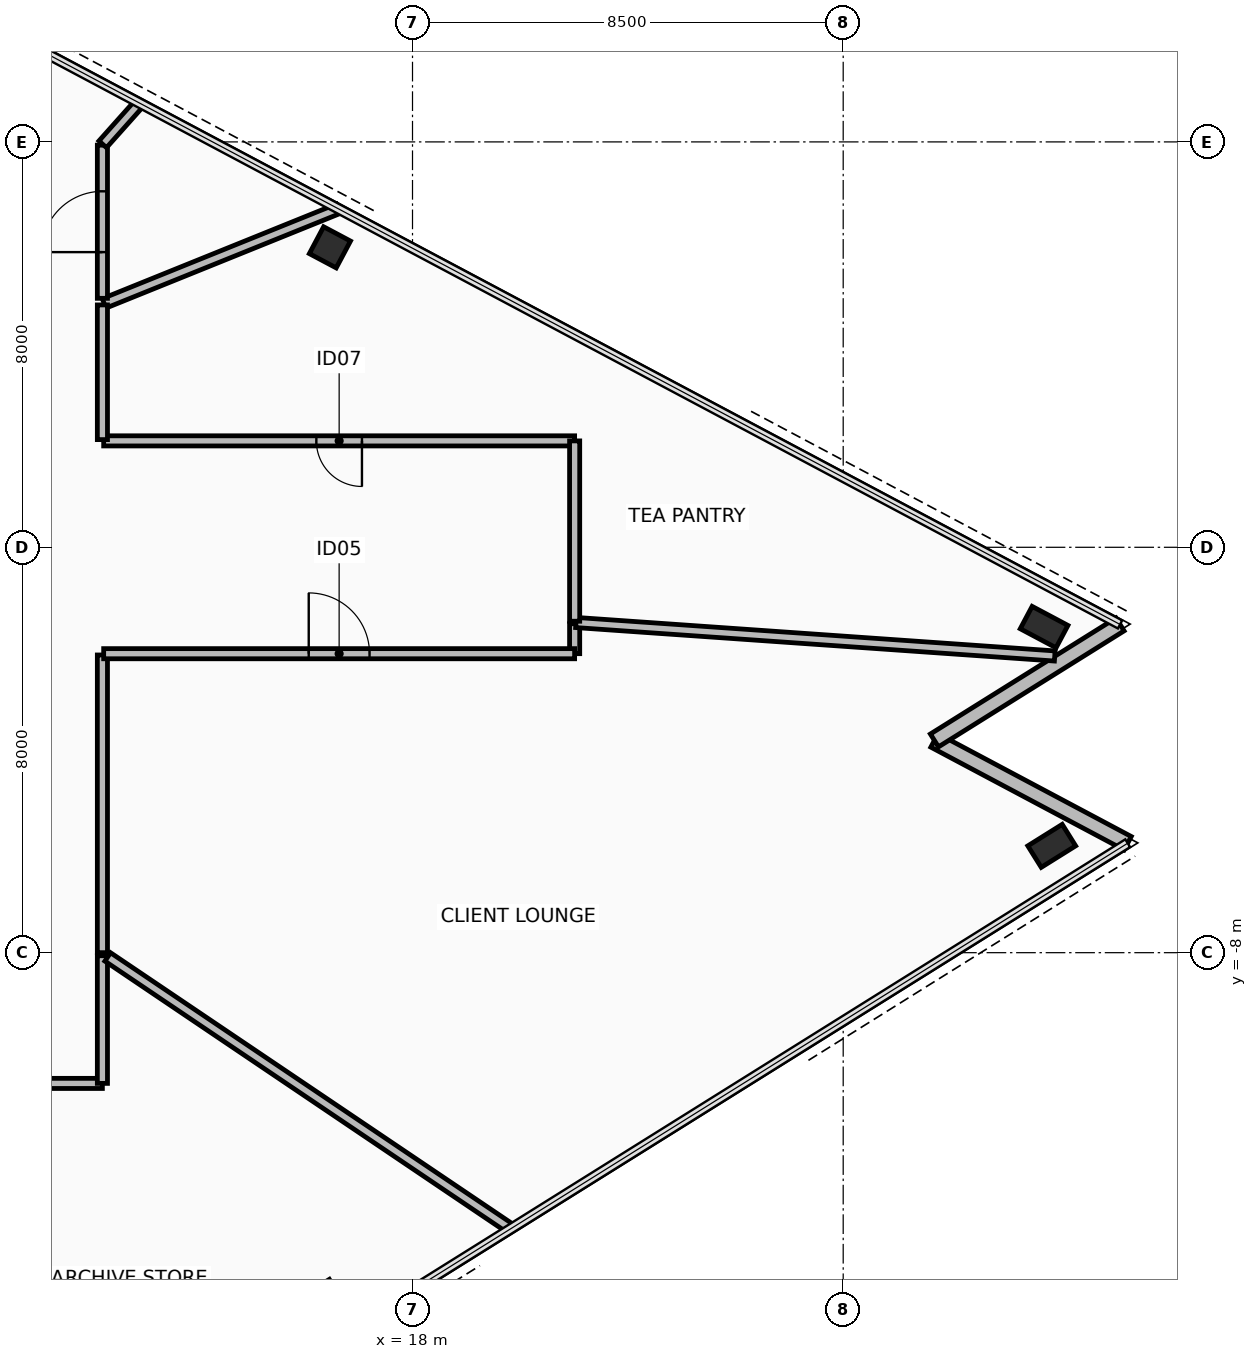
"""IFC4 building model, lengths in metres.
Left out: names, types, materials, properties, quantities, classifications, styles, units other than length and angle.
Written with IfcOpenShell. Run it as: python <this file> out.ifc"""

import sys

from ifc_helpers import new_model, si_unit, direction, frame, frame_2d, origin, origin_2d, place, context, subcontext, project, spatial, rectangle, hollow_rectangle, extrude, element, fill, save


model = new_model("IFC4")
c1 = context("Model", 3, precision=1e-05, world=origin(), true_north=direction((0.0, 1.0)))
c2 = subcontext(c1, "Body", "Model", "MODEL_VIEW")
j1 = project(units=[si_unit("LENGTHUNIT", "METRE"), si_unit("PLANEANGLEUNIT", "RADIAN")], contexts=[c1])
p1 = place(None, origin())
s1 = spatial("IfcSite", under=j1, at=p1, CompositionType="ELEMENT")
p2 = place(p1, origin())
s2 = spatial("IfcBuilding", under=s1, at=p2, CompositionType="ELEMENT")
p3 = place(p2, frame((0.0, 0.0, 149.6)))
s3 = spatial("IfcBuildingStorey", under=s2, at=p3, CompositionType="ELEMENT", Elevation=149.6)
for number, where, z_axis, x_axis in (
    (1, (30.615, -5.892, 0.0), (0.0, 0.0, 1.0), (0.848, 0.53, 0.0)),
    (2, (30.465, -1.575, 0.0), (0.0, 0.0, 1.0), (-0.883, 0.469, 0.0)),
):
    element("IfcColumn", number, at=place(p3, frame(where, z_axis=z_axis, x_axis=x_axis)), inside=s3, PredefinedType="COLUMN", context=c2, shape_type="SweptSolid", body=[
        extrude(hollow_rectangle(XDim=0.5, YDim=0.8, WallThickness=0.04, at=origin_2d()), origin(), (0.0, 0.0, 1.0), 3.6),
    ])
p4 = place(p3, frame((16.37, 5.919, 0.0), z_axis=(0.0, 0.0, 1.0), x_axis=(-0.88294841224, 0.469470021751, 0.0)))
e3 = element("IfcColumn", 3, at=p4, inside=s3, PredefinedType="COLUMN", context=c2, shape_type="SweptSolid", body=[
    extrude(hollow_rectangle(XDim=0.6, YDim=0.6, WallThickness=0.036, at=origin_2d()), origin(), (0.0, 0.0, 1.0), 3.6),
])
p5 = place(p3, frame((32.115, -5.84, 0.0), z_axis=(0.0, 0.0, 1.0), x_axis=(-0.882945167019, 0.469476125099, 0.0)))
e4 = element("IfcWall", 4, at=p5, inside=s3, PredefinedType="STANDARD", context=c2, shape_type="SweptSolid", body=[
    extrude(rectangle(XDim=4.32, YDim=0.3, at=frame_2d((2.16, 0.0))), origin(), (0.0, 0.0, 1.0), 2.705),
])
p6 = place(p3, frame((28.3, -3.812, 0.0), z_axis=(0.0, 0.0, 1.0), x_axis=(0.848042749904, 0.529927819929, 0.0)))
e5 = element("IfcWall", 5, at=p6, inside=s3, PredefinedType="STANDARD", context=c2, shape_type="SweptSolid", body=[
    extrude(rectangle(XDim=4.32, YDim=0.3, at=frame_2d((2.16, 0.0))), origin(), (0.0, 0.0, 1.0), 2.705),
])
p7 = place(p3, frame((16.536, 6.681, 0.0), z_axis=(0.0, 0.0, 1.0), x_axis=(-0.927180663406, -0.374614491718, 0.0)))
e6 = element("IfcWall", 6, at=p7, inside=s3, PredefinedType="PARTITIONING", context=c2, shape_type="SweptSolid", body=[
    extrude(rectangle(XDim=4.984, YDim=0.2, at=frame_2d((2.492, 0.0))), origin(), (0.0, 0.0, 1.0), 2.705),
])
p8 = place(p3, frame((11.88, 4.913, 0.0), z_axis=(0.0, 0.0, 1.0), x_axis=(0.0, 1.0, 0.0)))
e7 = element("IfcWall", 7, at=p8, inside=s3, PredefinedType="PARTITIONING", context=c2, shape_type="SweptSolid", body=[
    extrude(rectangle(XDim=3.023, YDim=0.2, at=frame_2d((1.512, 0.0))), origin(), (0.0, 0.0, 1.0), 2.855),
])
p9 = place(p8, frame((0.912, 0.0, 0.0)))
e8 = element("IfcOpeningElement", 8, at=p9, cuts=e7, PredefinedType="OPENING", context=c2, shape_type="SweptSolid", body=[
    extrude(rectangle(XDim=1.2, YDim=2.15, at=frame_2d((0.6, 1.075))), frame((0.0, 0.11, 0.0), z_axis=(0.0, -1.0, 0.0), x_axis=(1.0, 0.0, 0.0)), (0.0, 0.0, 1.0), 0.22),
])
p10 = place(p3, frame((11.886, 7.953, 0.0), z_axis=(0.0, 0.0, 1.0), x_axis=(0.665668753696, 0.746247351991, 0.0)))
e9 = element("IfcWall", 9, at=p10, inside=s3, PredefinedType="PARTITIONING", context=c2, shape_type="SweptSolid", body=[
    extrude(rectangle(XDim=1.091, YDim=0.2, at=frame_2d((0.545, 0.0))), origin(), (0.0, 0.0, 1.0), 2.705),
])
p11 = place(p3, frame((5.277, -10.58, 0.0), z_axis=(0.0, 0.0, 1.0), x_axis=(1.0, 0.0, 0.0)))
e10 = element("IfcWall", 10, at=p11, inside=s3, PredefinedType="PARTITIONING", context=c2, shape_type="SweptSolid", body=[
    extrude(rectangle(XDim=6.602, YDim=0.2, at=frame_2d((3.301, 0.0))), origin(), (0.0, 0.0, 1.0), 2.855),
])
p12 = place(p11, frame((2.851, 0.0, 0.0)))
e11 = element("IfcOpeningElement", 11, at=p12, cuts=e10, PredefinedType="OPENING", context=c2, shape_type="SweptSolid", body=[
    extrude(rectangle(XDim=0.9, YDim=2.1, at=frame_2d((0.45, 1.05))), frame((0.0, 0.11, 0.0), z_axis=(0.0, -1.0, 0.0), x_axis=(1.0, 0.0, 0.0)), (0.0, 0.0, 1.0), 0.22),
])
p13 = place(p3, frame((11.88, -10.579, 0.0), z_axis=(0.0, 0.0, 1.0), x_axis=(0.0, 1.0, 0.0)))
e12 = element("IfcWall", 12, at=p13, inside=s3, PredefinedType="PARTITIONING", context=c2, shape_type="SweptSolid", body=[
    extrude(rectangle(XDim=2.519, YDim=0.2, at=frame_2d((1.26, 0.0))), origin(), (0.0, 0.0, 1.0), 2.855),
])
p14 = place(p3, frame((11.985, -8.084, 0.0), z_axis=(0.0, 0.0, 1.0), x_axis=(0.8290350884, -0.559196586365, 0.0)))
e13 = element("IfcWall", 13, at=p14, inside=s3, PredefinedType="PARTITIONING", context=c2, shape_type="SweptSolid", body=[
    extrude(rectangle(XDim=9.593, YDim=0.2, at=frame_2d((4.797, 0.0))), origin(), (0.0, 0.0, 1.0), 2.705),
])
p15 = place(p3, frame((21.2, -2.099, 0.0), z_axis=(0.0, 0.0, 1.0), x_axis=(0.0, 1.0, 0.0)))
e14 = element("IfcWall", 14, at=p15, inside=s3, PredefinedType="PARTITIONING", context=c2, shape_type="SweptSolid", body=[
    extrude(rectangle(XDim=0.59, YDim=0.2, at=frame_2d((0.295, 0.0))), origin(), (0.0, 0.0, 1.0), 3.41),
])
p16 = place(p3, frame((21.227, -1.484, 0.0), z_axis=(0.0, 0.0, 1.0), x_axis=(0.997564350918, -0.069752173994, 0.0)))
e15 = element("IfcWall", 15, at=p16, inside=s3, PredefinedType="PARTITIONING", context=c2, shape_type="SweptSolid", body=[
    extrude(rectangle(XDim=9.471, YDim=0.2, at=frame_2d((4.736, 0.0))), origin(), (0.0, 0.0, 1.0), 2.705),
])
p17 = place(p3, frame((11.88, -8.0, 0.0), z_axis=(0.0, 0.0, 1.0), x_axis=(0.0, 1.0, 0.0)))
e16 = element("IfcWall", 16, at=p17, inside=s3, PredefinedType="PARTITIONING", context=c2, shape_type="SweptSolid", body=[
    extrude(rectangle(XDim=5.875, YDim=0.2, at=frame_2d((2.938, 0.0))), origin(), (0.0, 0.0, 1.0), 2.855),
])
p18 = place(p3, frame((11.905, -2.1, 0.0), z_axis=(0.0, 0.0, 1.0), x_axis=(1.0, 0.0, 0.0)))
e17 = element("IfcWall", 17, at=p18, inside=s3, PredefinedType="PARTITIONING", context=c2, shape_type="SweptSolid", body=[
    extrude(rectangle(XDim=9.294, YDim=0.2, at=frame_2d((4.647, 0.0))), origin(), (0.0, 0.0, 1.0), 3.045),
])
p19 = place(p18, frame((4.047, 0.0, 0.0)))
e18 = element("IfcOpeningElement", 18, at=p19, cuts=e17, PredefinedType="OPENING", context=c2, shape_type="SweptSolid", body=[
    extrude(rectangle(XDim=1.2, YDim=2.15, at=frame_2d((0.6, 1.075))), frame((0.0, 0.11, 0.0), z_axis=(0.0, -1.0, 0.0), x_axis=(1.0, 0.0, 0.0)), (0.0, 0.0, 1.0), 0.22),
])
p20 = place(p3, frame((21.199, 2.1, 0.0), z_axis=(0.0, 0.0, 1.0), x_axis=(-1.0, 0.0, 0.0)))
e19 = element("IfcWall", 19, at=p20, inside=s3, PredefinedType="PARTITIONING", context=c2, shape_type="SweptSolid", body=[
    extrude(rectangle(XDim=9.294, YDim=0.2, at=frame_2d((4.647, 0.0))), origin(), (0.0, 0.0, 1.0), 3.045),
])
p21 = place(p20, frame((4.197, 0.0, 0.0)))
e20 = element("IfcOpeningElement", 20, at=p21, cuts=e19, PredefinedType="OPENING", context=c2, shape_type="SweptSolid", body=[
    extrude(rectangle(XDim=0.9, YDim=2.1, at=frame_2d((0.45, 1.05))), frame((0.0, 0.11, 0.0), z_axis=(0.0, -1.0, 0.0), x_axis=(1.0, 0.0, 0.0)), (0.0, 0.0, 1.0), 0.22),
])
p22 = place(p3, frame((11.88, 2.125, 0.0), z_axis=(0.0, 0.0, 1.0), x_axis=(0.0, 1.0, 0.0)))
e21 = element("IfcWall", 21, at=p22, inside=s3, PredefinedType="PARTITIONING", context=c2, shape_type="SweptSolid", body=[
    extrude(rectangle(XDim=2.658, YDim=0.2, at=frame_2d((1.329, 0.0))), origin(), (0.0, 0.0, 1.0), 3.41),
])
p23 = place(p3, frame((21.2, -1.459, 0.0), z_axis=(0.0, 0.0, 1.0), x_axis=(0.0, 1.0, 0.0)))
e22 = element("IfcWall", 22, at=p23, inside=s3, PredefinedType="PARTITIONING", context=c2, shape_type="SweptSolid", body=[
    extrude(rectangle(XDim=3.558, YDim=0.2, at=frame_2d((1.779, 0.0))), origin(), (0.0, 0.0, 1.0), 3.045),
])
p24 = place(p9, origin())
e23 = element("IfcDoor", 23, at=p24, inside=s3, OperationType="SINGLE_SWING_LEFT", PredefinedType="DOOR", context=c2, shape_type="SweptSolid", body=[
    extrude(rectangle(XDim=1.2, YDim=2.15, at=frame_2d((0.6, 1.075))), frame((0.0, 0.025, 0.0), z_axis=(0.0, -1.0, 0.0), x_axis=(1.0, 0.0, 0.0)), (0.0, 0.0, 1.0), 0.05),
])
fill(e8, e23)
p25 = place(p19, origin())
e24 = element("IfcDoor", 24, at=p25, inside=s3, OperationType="SINGLE_SWING_LEFT", PredefinedType="DOOR", context=c2, shape_type="SweptSolid", body=[
    extrude(rectangle(XDim=1.2, YDim=2.15, at=frame_2d((0.6, 1.075))), frame((0.0, 0.025, 0.0), z_axis=(0.0, -1.0, 0.0), x_axis=(1.0, 0.0, 0.0)), (0.0, 0.0, 1.0), 0.05),
])
fill(e18, e24)
p26 = place(p21, origin())
e25 = element("IfcDoor", 25, at=p26, inside=s3, OperationType="SINGLE_SWING_LEFT", PredefinedType="DOOR", context=c2, shape_type="SweptSolid", body=[
    extrude(rectangle(XDim=0.9, YDim=2.1, at=frame_2d((0.45, 1.05))), frame((0.0, 0.025, 0.0), z_axis=(0.0, -1.0, 0.0), x_axis=(1.0, 0.0, 0.0)), (0.0, 0.0, 1.0), 0.05),
])
fill(e20, e25)
save(model, sys.argv[1])
